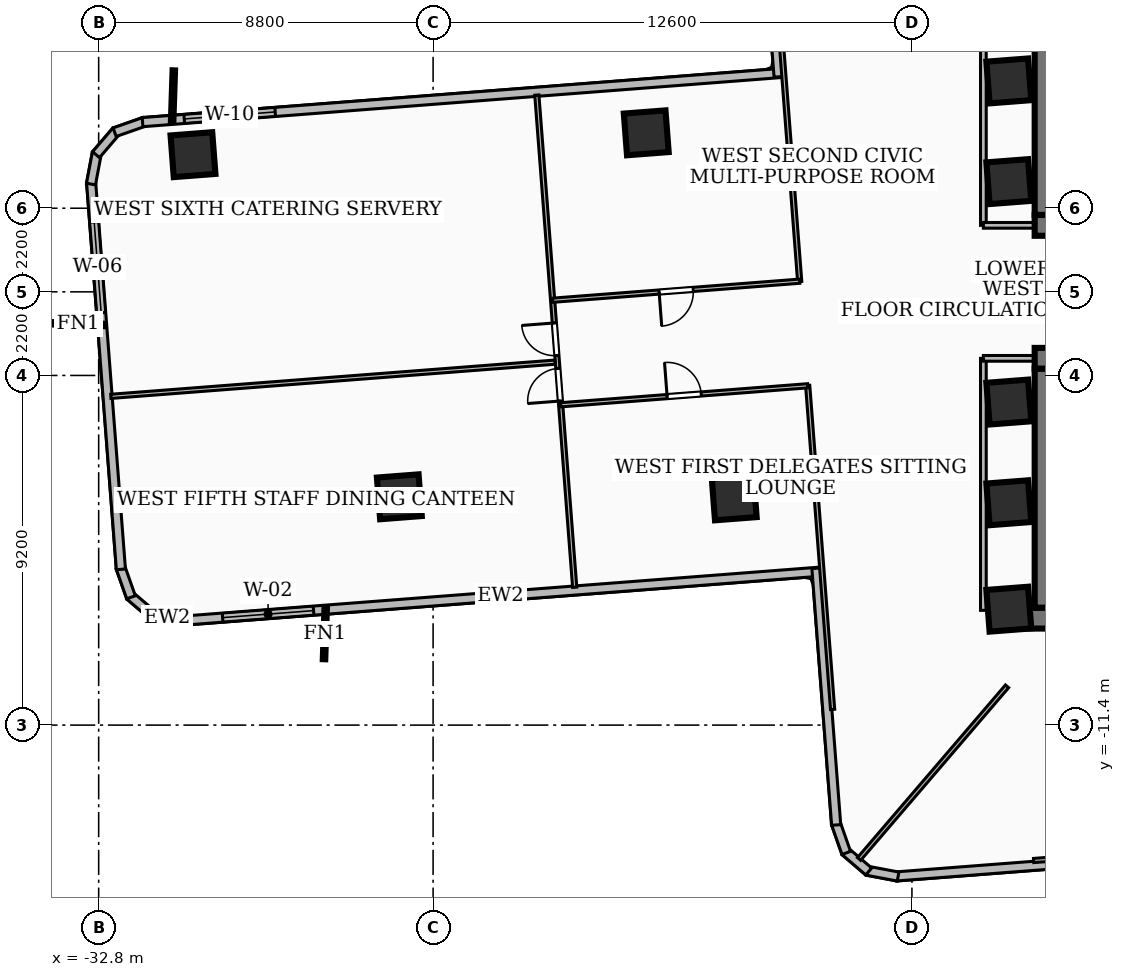
"""IFC4 building model, lengths in metres.
Left out: names, types, materials, properties, quantities, classifications, styles, units other than length and angle.
Written with IfcOpenShell. Run it as: python <this file> out.ifc"""

import sys

from ifc_helpers import new_model, si_unit, direction, frame, frame_2d, origin, origin_2d, place, context, subcontext, project, spatial, rectangle, extrude, element, fill, save


model = new_model("IFC4")
c1 = context("Model", 3, precision=1e-05, world=origin(), true_north=direction((0.0, 1.0)))
c2 = subcontext(c1, "Body", "Model", "MODEL_VIEW")
j1 = project(units=[si_unit("LENGTHUNIT", "METRE"), si_unit("PLANEANGLEUNIT", "RADIAN")], contexts=[c1])
p1 = place(None, origin())
s1 = spatial("IfcSite", under=j1, at=p1, CompositionType="ELEMENT")
p2 = place(p1, origin())
s2 = spatial("IfcBuilding", under=s1, at=p2, CompositionType="ELEMENT")
p3 = place(p2, frame((0.0, 0.0, 56.88)))
s3 = spatial("IfcBuildingStorey", under=s2, at=p3, CompositionType="ELEMENT", Elevation=56.88)
p4 = place(p3, frame((8.17, 1.75, 0.0), z_axis=(0.0, 0.0, 1.0), x_axis=(-1.0, 0.0, 0.0)))
e1 = element("IfcWall", 1, at=p4, inside=s3, PredefinedType="SHEAR", context=c2, shape_type="SweptSolid", body=[
    extrude(rectangle(XDim=16.34, YDim=0.55, at=frame_2d((8.17, 0.0))), origin(), (0.0, 0.0, 1.0), 3.32),
])
p5 = place(p4, frame((7.45, 0.0, 0.0)))
e2 = element("IfcOpeningElement", 2, at=p5, cuts=e1, PredefinedType="OPENING", context=c2, shape_type="SweptSolid", body=[
    extrude(rectangle(XDim=1.0, YDim=2.1, at=frame_2d((0.5, 1.05))), frame((0.0, 0.285, 0.0), z_axis=(0.0, -1.0, 0.0), x_axis=(1.0, 0.0, 0.0)), (0.0, 0.0, 1.0), 0.57),
])
p6 = place(p4, frame((3.4, 0.0, 0.0)))
e3 = element("IfcOpeningElement", 3, at=p6, cuts=e1, PredefinedType="OPENING", context=c2, shape_type="SweptSolid", body=[
    extrude(rectangle(XDim=0.9, YDim=2.06, at=frame_2d((0.45, 1.03))), frame((0.0, 0.285, 0.0), z_axis=(0.0, -1.0, 0.0), x_axis=(1.0, 0.0, 0.0)), (0.0, 0.0, 1.0), 0.57),
])
p7 = place(p4, frame((1.1, 0.0, 0.0)))
e4 = element("IfcOpeningElement", 4, at=p7, cuts=e1, PredefinedType="OPENING", context=c2, shape_type="SweptSolid", body=[
    extrude(rectangle(XDim=0.9, YDim=2.06, at=frame_2d((0.45, 1.03))), frame((0.0, 0.285, 0.0), z_axis=(0.0, -1.0, 0.0), x_axis=(1.0, 0.0, 0.0)), (0.0, 0.0, 1.0), 0.57),
])
p8 = place(p3, frame((-7.895, 2.025, 0.0), z_axis=(0.0, 0.0, 1.0), x_axis=(0.0, 1.0, 0.0)))
e5 = element("IfcWall", 5, at=p8, inside=s3, PredefinedType="SHEAR", context=c2, shape_type="SweptSolid", body=[
    extrude(rectangle(XDim=6.285, YDim=0.55, at=frame_2d((3.143, 0.0))), origin(), (0.0, 0.0, 1.0), 3.32),
])
p9 = place(p3, frame((8.78, -8.585, 0.0), z_axis=(0.0, 0.0, 1.0), x_axis=(-1.0, 0.0, 0.0)))
e6 = element("IfcWall", 6, at=p9, inside=s3, PredefinedType="SHEAR", context=c2, shape_type="SweptSolid", body=[
    extrude(rectangle(XDim=17.56, YDim=0.55, at=frame_2d((8.78, 0.0))), origin(), (0.0, 0.0, 1.0), 3.32),
])
p10 = place(p3, frame((-8.17, -1.75, 0.0), z_axis=(0.0, 0.0, 1.0), x_axis=(1.0, 0.0, 0.0)))
e7 = element("IfcWall", 7, at=p10, inside=s3, PredefinedType="SHEAR", context=c2, shape_type="SweptSolid", body=[
    extrude(rectangle(XDim=16.34, YDim=0.55, at=frame_2d((8.17, 0.0))), origin(), (0.0, 0.0, 1.0), 3.32),
])
p11 = place(p10, frame((7.45, 0.0, 0.0)))
e8 = element("IfcOpeningElement", 8, at=p11, cuts=e7, PredefinedType="OPENING", context=c2, shape_type="SweptSolid", body=[
    extrude(rectangle(XDim=1.0, YDim=2.1, at=frame_2d((0.5, 1.05))), frame((0.0, 0.285, 0.0), z_axis=(0.0, -1.0, 0.0), x_axis=(1.0, 0.0, 0.0)), (0.0, 0.0, 1.0), 0.57),
])
p12 = place(p10, frame((10.965, 0.0, 0.0)))
e9 = element("IfcOpeningElement", 9, at=p12, cuts=e7, PredefinedType="OPENING", context=c2, shape_type="SweptSolid", body=[
    extrude(rectangle(XDim=1.05, YDim=2.15, at=frame_2d((0.525, 1.075))), frame((0.0, 0.285, 0.0), z_axis=(0.0, -1.0, 0.0), x_axis=(1.0, 0.0, 0.0)), (0.0, 0.0, 1.0), 0.57),
])
p13 = place(p10, frame((12.525, 0.0, 0.0)))
e10 = element("IfcOpeningElement", 10, at=p13, cuts=e7, PredefinedType="OPENING", context=c2, shape_type="SweptSolid", body=[
    extrude(rectangle(XDim=1.05, YDim=2.15, at=frame_2d((0.525, 1.075))), frame((0.0, 0.285, 0.0), z_axis=(0.0, -1.0, 0.0), x_axis=(1.0, 0.0, 0.0)), (0.0, 0.0, 1.0), 0.57),
])
p14 = place(p10, frame((14.085, 0.0, 0.0)))
e11 = element("IfcOpeningElement", 11, at=p14, cuts=e7, PredefinedType="OPENING", context=c2, shape_type="SweptSolid", body=[
    extrude(rectangle(XDim=1.05, YDim=2.15, at=frame_2d((0.525, 1.075))), frame((0.0, 0.285, 0.0), z_axis=(0.0, -1.0, 0.0), x_axis=(1.0, 0.0, 0.0)), (0.0, 0.0, 1.0), 0.57),
])
p15 = place(p3, frame((-7.895, -8.31, 0.0), z_axis=(0.0, 0.0, 1.0), x_axis=(0.0, 1.0, 0.0)))
e12 = element("IfcWall", 12, at=p15, inside=s3, PredefinedType="SHEAR", context=c2, shape_type="SweptSolid", body=[
    extrude(rectangle(XDim=6.285, YDim=0.55, at=frame_2d((3.143, 0.0))), origin(), (0.0, 0.0, 1.0), 3.32),
])
for number, where, z_axis, x_axis in (
    (13, (-8.85, -5.55, 0.0), (0.0, 0.0, 1.0), (0.997, 0.077, 0.0)),
    (14, (-8.85, -2.9, 0.0), (0.0, 0.0, 1.0), (0.997, 0.077, 0.0)),
    (15, (-8.85, 2.9, 0.0), (0.0, 0.0, 1.0), (0.997, 0.077, 0.0)),
    (16, (-8.85, 5.55, 0.0), (0.0, 0.0, 1.0), (0.997, 0.077, 0.0)),
    (17, (-8.85, -8.35, 0.0), (0.0, 0.0, 1.0), (0.997, 0.077, 0.0)),
    (18, (-18.391, 4.184, 0.0), (0.0, 0.0, 1.0), (0.997, 0.077, 0.0)),
    (19, (-16.076, -5.421, 0.0), (0.0, 0.0, 1.0), (0.997, 0.077, 0.0)),
    (20, (-30.318, 3.609, 0.0), (0.0, 0.0, 1.0), (0.997, 0.077, 0.0)),
    (21, (-24.888, -5.393, 0.0), (0.0, 0.0, 1.0), (0.997, 0.077, 0.0)),
):
    element("IfcColumn", number, at=place(p3, frame(where, z_axis=z_axis, x_axis=x_axis)), inside=s3, PredefinedType="COLUMN", context=c2, shape_type="SweptSolid", body=[
        extrude(rectangle(XDim=1.1, YDim=1.1, at=origin_2d()), origin(), (0.0, 0.0, 1.0), 3.6),
    ])
p16 = place(p3, frame((-13.81, -7.362, 0.0), z_axis=(0.0, 0.0, 1.0), x_axis=(-0.997055761943, -0.076679903335, 0.0)))
e22 = element("IfcWall", 22, at=p16, inside=s3, PredefinedType="SOLIDWALL", context=c2, shape_type="SweptSolid", body=[
    extrude(rectangle(XDim=16.875, YDim=0.24, at=frame_2d((8.438, 0.0))), origin(), (0.0, 0.0, 1.0), 3.32),
])
p17 = place(p16, frame((13.375, 0.0, 0.85)))
e23 = element("IfcOpeningElement", 23, at=p17, cuts=e22, PredefinedType="OPENING", context=c2, shape_type="SweptSolid", body=[
    extrude(rectangle(XDim=2.4, YDim=2.1, at=frame_2d((1.2, 1.05))), frame((0.0, 0.13, 0.0), z_axis=(0.0, -1.0, 0.0), x_axis=(1.0, 0.0, 0.0)), (0.0, 0.0, 1.0), 0.26),
])
p18 = place(p3, frame((-30.585, -8.659, 0.0), z_axis=(0.0, 0.0, 1.0), x_axis=(-0.982688894005, 0.185263427582, 0.0)))
e24 = element("IfcWall", 24, at=p18, inside=s3, PredefinedType="SOLIDWALL", context=c2, shape_type="SweptSolid", body=[
    extrude(rectangle(XDim=0.832, YDim=0.24, at=frame_2d((0.416, 0.0))), origin(), (0.0, 0.0, 1.0), 3.32),
])
p19 = place(p3, frame((-31.358, -8.526, 0.0), z_axis=(0.0, 0.0, 1.0), x_axis=(-0.759891778471, 0.650049601962, 0.0)))
e25 = element("IfcWall", 25, at=p19, inside=s3, PredefinedType="SOLIDWALL", context=c2, shape_type="SweptSolid", body=[
    extrude(rectangle(XDim=0.813, YDim=0.24, at=frame_2d((0.407, 0.0))), origin(), (0.0, 0.0, 1.0), 3.32),
])
p20 = place(p3, frame((-31.949, -8.037, 0.0), z_axis=(0.0, 0.0, 1.0), x_axis=(-0.332128799234, 0.943234043448, 0.0)))
e26 = element("IfcWall", 26, at=p20, inside=s3, PredefinedType="SOLIDWALL", context=c2, shape_type="SweptSolid", body=[
    extrude(rectangle(XDim=0.831, YDim=0.24, at=frame_2d((0.416, 0.0))), origin(), (0.0, 0.0, 1.0), 3.32),
])
p21 = place(p3, frame((-32.215, -7.302, 0.0), z_axis=(0.0, 0.0, 1.0), x_axis=(-0.076720251263, 0.997052658111, 0.0)))
e27 = element("IfcWall", 27, at=p21, inside=s3, PredefinedType="SOLIDWALL", context=c2, shape_type="SweptSolid", body=[
    extrude(rectangle(XDim=10.218, YDim=0.24, at=frame_2d((5.109, 0.0))), origin(), (0.0, 0.0, 1.0), 3.32),
])
p22 = place(p21, frame((6.77, 0.0, 0.85)))
e28 = element("IfcOpeningElement", 28, at=p22, cuts=e27, PredefinedType="OPENING", context=c2, shape_type="SweptSolid", body=[
    extrude(rectangle(XDim=2.4, YDim=1.85, at=frame_2d((1.2, 0.925))), frame((0.0, 0.13, 0.0), z_axis=(0.0, -1.0, 0.0), x_axis=(1.0, 0.0, 0.0)), (0.0, 0.0, 1.0), 0.26),
])
p23 = place(p3, frame((-33.002, 2.836, 0.0), z_axis=(0.0, 0.0, 1.0), x_axis=(0.185263427582, 0.982688894005, 0.0)))
e29 = element("IfcWall", 29, at=p23, inside=s3, PredefinedType="SOLIDWALL", context=c2, shape_type="SweptSolid", body=[
    extrude(rectangle(XDim=0.832, YDim=0.24, at=frame_2d((0.416, 0.0))), origin(), (0.0, 0.0, 1.0), 3.32),
])
p24 = place(p3, frame((-32.869, 3.609, 0.0), z_axis=(0.0, 0.0, 1.0), x_axis=(0.650049601962, 0.759891778471, 0.0)))
e30 = element("IfcWall", 30, at=p24, inside=s3, PredefinedType="SOLIDWALL", context=c2, shape_type="SweptSolid", body=[
    extrude(rectangle(XDim=0.813, YDim=0.24, at=frame_2d((0.407, 0.0))), origin(), (0.0, 0.0, 1.0), 3.32),
])
p25 = place(p3, frame((-32.38, 4.2, 0.0), z_axis=(0.0, 0.0, 1.0), x_axis=(0.943569376564, 0.331174926, 0.0)))
e31 = element("IfcWall", 31, at=p25, inside=s3, PredefinedType="SOLIDWALL", context=c2, shape_type="SweptSolid", body=[
    extrude(rectangle(XDim=0.831, YDim=0.24, at=frame_2d((0.416, 0.0))), origin(), (0.0, 0.0, 1.0), 3.32),
])
p26 = place(p3, frame((-31.645, 4.465, 0.0), z_axis=(0.0, 0.0, 1.0), x_axis=(0.997051676532, 0.076733006752, 0.0)))
e32 = element("IfcWall", 32, at=p26, inside=s3, PredefinedType="SOLIDWALL", context=c2, shape_type="SweptSolid", body=[
    extrude(rectangle(XDim=16.876, YDim=0.24, at=frame_2d((8.438, 0.0))), origin(), (0.0, 0.0, 1.0), 3.32),
])
p27 = place(p26, frame((1.1, 0.0, 0.85)))
e33 = element("IfcOpeningElement", 33, at=p27, cuts=e32, PredefinedType="OPENING", context=c2, shape_type="SweptSolid", body=[
    extrude(rectangle(XDim=2.4, YDim=1.65, at=frame_2d((1.2, 0.825))), frame((0.0, 0.13, 0.0), z_axis=(0.0, -1.0, 0.0), x_axis=(1.0, 0.0, 0.0)), (0.0, 0.0, 1.0), 0.26),
])
p28 = place(p3, frame((-14.908, 5.657, 0.0), z_axis=(0.0, 0.0, 1.0), x_axis=(-0.076778128006, 0.997048202977, 0.0)))
e34 = element("IfcWall", 34, at=p28, inside=s3, PredefinedType="SOLIDWALL", context=c2, shape_type="SweptSolid", body=[
    extrude(rectangle(XDim=6.175, YDim=0.24, at=frame_2d((3.088, 0.0))), origin(), (0.0, 0.0, 1.0), 3.32),
])
p29 = place(p3, frame((-5.657, -14.908, 0.0), z_axis=(0.0, 0.0, 1.0), x_axis=(-0.997048202977, -0.076778128006, 0.0)))
e35 = element("IfcWall", 35, at=p29, inside=s3, PredefinedType="SOLIDWALL", context=c2, shape_type="SweptSolid", body=[
    extrude(rectangle(XDim=6.175, YDim=0.24, at=frame_2d((3.088, 0.0))), origin(), (0.0, 0.0, 1.0), 2.401),
])
p30 = place(p3, frame((-11.764, -15.385, 0.0), z_axis=(0.0, 0.0, 1.0), x_axis=(-0.982688894005, 0.185263427582, 0.0)))
e36 = element("IfcWall", 36, at=p30, inside=s3, PredefinedType="SOLIDWALL", context=c2, shape_type="SweptSolid", body=[
    extrude(rectangle(XDim=0.832, YDim=0.24, at=frame_2d((0.416, 0.0))), origin(), (0.0, 0.0, 1.0), 3.32),
])
p31 = place(p3, frame((-12.537, -15.252, 0.0), z_axis=(0.0, 0.0, 1.0), x_axis=(-0.759616636226, 0.650371098657, 0.0)))
e37 = element("IfcWall", 37, at=p31, inside=s3, PredefinedType="SOLIDWALL", context=c2, shape_type="SweptSolid", body=[
    extrude(rectangle(XDim=0.813, YDim=0.24, at=frame_2d((0.407, 0.0))), origin(), (0.0, 0.0, 1.0), 3.32),
])
p32 = place(p3, frame((-13.128, -14.763, 0.0), z_axis=(0.0, 0.0, 1.0), x_axis=(-0.331174926, 0.943569376564, 0.0)))
e38 = element("IfcWall", 38, at=p32, inside=s3, PredefinedType="SOLIDWALL", context=c2, shape_type="SweptSolid", body=[
    extrude(rectangle(XDim=0.831, YDim=0.24, at=frame_2d((0.416, 0.0))), origin(), (0.0, 0.0, 1.0), 3.32),
])
p33 = place(p3, frame((-13.393, -14.028, 0.0), z_axis=(0.0, 0.0, 1.0), x_axis=(-0.076754366588, 0.997050032451, 0.0)))
e39 = element("IfcWall", 39, at=p33, inside=s3, PredefinedType="SOLIDWALL", context=c2, shape_type="SweptSolid", body=[
    extrude(rectangle(XDim=6.775, YDim=0.24, at=frame_2d((3.388, 0.0))), origin(), (0.0, 0.0, 1.0), 3.32),
])
p34 = place(p3, frame((-9.52, 1.75, 0.0), z_axis=(0.0, 0.0, 1.0), x_axis=(0.0, 1.0, 0.0)))
e40 = element("IfcWall", 40, at=p34, inside=s3, PredefinedType="PARTITIONING", context=c2, shape_type="SweptSolid", body=[
    extrude(rectangle(XDim=6.63, YDim=0.15, at=frame_2d((3.315, 0.0))), origin(), (0.0, 0.0, 1.0), 2.401),
])
p35 = place(p3, frame((-7.85, 1.75, 0.0), z_axis=(0.0, 0.0, 1.0), x_axis=(-1.0, 0.0, 0.0)))
e41 = element("IfcWall", 41, at=p35, inside=s3, PredefinedType="PARTITIONING", context=c2, shape_type="SweptSolid", body=[
    extrude(rectangle(XDim=1.67, YDim=0.15, at=frame_2d((0.835, 0.0))), origin(), (0.0, 0.0, 1.0), 2.385),
])
p36 = place(p3, frame((-9.52, -8.38, 0.0), z_axis=(0.0, 0.0, 1.0), x_axis=(0.0, 1.0, 0.0)))
e42 = element("IfcWall", 42, at=p36, inside=s3, PredefinedType="PARTITIONING", context=c2, shape_type="SweptSolid", body=[
    extrude(rectangle(XDim=6.63, YDim=0.15, at=frame_2d((3.315, 0.0))), origin(), (0.0, 0.0, 1.0), 2.401),
])
p37 = place(p3, frame((-7.85, -1.75, 0.0), z_axis=(0.0, 0.0, 1.0), x_axis=(-1.0, 0.0, 0.0)))
e43 = element("IfcWall", 43, at=p37, inside=s3, PredefinedType="PARTITIONING", context=c2, shape_type="SweptSolid", body=[
    extrude(rectangle(XDim=1.67, YDim=0.15, at=frame_2d((0.835, 0.0))), origin(), (0.0, 0.0, 1.0), 2.385),
])
p38 = place(p3, frame((-8.897, -10.38, 0.0), z_axis=(0.0, 0.0, 1.0), x_axis=(-0.650777932984, -0.759268122564, 0.0)))
e44 = element("IfcWall", 44, at=p38, inside=s3, PredefinedType="PARTITIONING", context=c2, shape_type="SweptSolid", body=[
    extrude(rectangle(XDim=5.984, YDim=0.11, at=frame_2d((2.992, 0.0))), origin(), (0.0, 0.0, 1.0), 3.32),
])
p39 = place(p3, frame((-14.143, -2.462, 0.0), z_axis=(0.0, 0.0, 1.0), x_axis=(0.076722700704, -0.997052469631, 0.0)))
e45 = element("IfcWall", 45, at=p39, inside=s3, PredefinedType="PARTITIONING", context=c2, shape_type="SweptSolid", body=[
    extrude(rectangle(XDim=8.55, YDim=0.11, at=frame_2d((4.275, 0.0))), origin(), (0.0, 0.0, 1.0), 2.401),
])
p40 = place(p3, frame((-14.963, 8.197, 0.0), z_axis=(0.0, 0.0, 1.0), x_axis=(0.076708240121, -0.99705358226, 0.0)))
e46 = element("IfcWall", 46, at=p40, inside=s3, PredefinedType="PARTITIONING", context=c2, shape_type="SweptSolid", body=[
    extrude(rectangle(XDim=7.95, YDim=0.11, at=frame_2d((3.975, 0.0))), origin(), (0.0, 0.0, 1.0), 2.401),
])
p41 = place(p3, frame((-20.643, -2.972, 0.0), z_axis=(0.0, 0.0, 1.0), x_axis=(0.997055366468, 0.076685045461, 0.0)))
e47 = element("IfcWall", 47, at=p41, inside=s3, PredefinedType="PARTITIONING", context=c2, shape_type="SweptSolid", body=[
    extrude(rectangle(XDim=6.52, YDim=0.11, at=frame_2d((3.26, 0.0))), origin(), (0.0, 0.0, 1.0), 3.32),
])
p42 = place(p41, frame((2.81, 0.0, 0.0)))
e48 = element("IfcOpeningElement", 48, at=p42, cuts=e47, PredefinedType="OPENING", context=c2, shape_type="SweptSolid", body=[
    extrude(rectangle(XDim=0.9, YDim=2.06, at=frame_2d((0.45, 1.03))), frame((0.0, 0.065, 0.0), z_axis=(0.0, -1.0, 0.0), x_axis=(1.0, 0.0, 0.0)), (0.0, 0.0, 1.0), 0.13),
])
p43 = place(p3, frame((-14.354, 0.28, 0.0), z_axis=(0.0, 0.0, 1.0), x_axis=(-0.997043903764, -0.076833937604, 0.0)))
e49 = element("IfcWall", 49, at=p43, inside=s3, PredefinedType="PARTITIONING", context=c2, shape_type="SweptSolid", body=[
    extrude(rectangle(XDim=6.52, YDim=0.11, at=frame_2d((3.26, 0.0))), origin(), (0.0, 0.0, 1.0), 3.32),
])
p44 = place(p43, frame((2.81, 0.0, 0.0)))
e50 = element("IfcOpeningElement", 50, at=p44, cuts=e49, PredefinedType="OPENING", context=c2, shape_type="SweptSolid", body=[
    extrude(rectangle(XDim=0.9, YDim=2.06, at=frame_2d((0.45, 1.03))), frame((0.0, 0.065, 0.0), z_axis=(0.0, -1.0, 0.0), x_axis=(1.0, 0.0, 0.0)), (0.0, 0.0, 1.0), 0.13),
])
p45 = place(p3, frame((-20.789, -1.85, 0.0), z_axis=(0.0, 0.0, 1.0), x_axis=(-0.997050564889, -0.076747449822, 0.0)))
e51 = element("IfcWall", 51, at=p45, inside=s3, PredefinedType="PARTITIONING", context=c2, shape_type="SweptSolid", body=[
    extrude(rectangle(XDim=11.726, YDim=0.11, at=frame_2d((5.863, 0.0))), origin(), (0.0, 0.0, 1.0), 2.812),
])
p46 = place(p3, frame((-20.274, -7.773, 0.0), z_axis=(0.0, 0.0, 1.0), x_axis=(-0.076686437656, 0.997055259391, 0.0)))
e52 = element("IfcWall", 52, at=p46, inside=s3, PredefinedType="PARTITIONING", context=c2, shape_type="SweptSolid", body=[
    extrude(rectangle(XDim=12.989, YDim=0.11, at=frame_2d((6.495, 0.0))), origin(), (0.0, 0.0, 1.0), 2.401),
])
p47 = place(p46, frame((6.115, 0.0, 0.0)))
e53 = element("IfcOpeningElement", 53, at=p47, cuts=e52, PredefinedType="OPENING", context=c2, shape_type="SweptSolid", body=[
    extrude(rectangle(XDim=0.86, YDim=2.04, at=frame_2d((0.43, 1.02))), frame((0.0, 0.065, 0.0), z_axis=(0.0, -1.0, 0.0), x_axis=(1.0, 0.0, 0.0)), (0.0, 0.0, 1.0), 0.13),
])
p48 = place(p46, frame((4.915, 0.0, 0.0)))
e54 = element("IfcOpeningElement", 54, at=p48, cuts=e52, PredefinedType="OPENING", context=c2, shape_type="SweptSolid", body=[
    extrude(rectangle(XDim=0.86, YDim=2.04, at=frame_2d((0.43, 1.02))), frame((0.0, 0.065, 0.0), z_axis=(0.0, -1.0, 0.0), x_axis=(1.0, 0.0, 0.0)), (0.0, 0.0, 1.0), 0.13),
])
p49 = place(p3, frame((-8.197, -14.963, 0.0), z_axis=(0.0, 0.0, 1.0), x_axis=(0.99705358226, 0.076708240121, 0.0)))
e55 = element("IfcWall", 55, at=p49, inside=s3, PredefinedType="PARTITIONING", context=c2, shape_type="SweptSolid", body=[
    extrude(rectangle(XDim=7.95, YDim=0.11, at=frame_2d((3.975, 0.0))), origin(), (0.0, 0.0, 1.0), 2.401),
])
p50 = place(p17, origin())
e56 = element("IfcWindow", 56, at=p50, inside=s3, PartitioningType="SINGLE_PANEL", PredefinedType="WINDOW", context=c2, shape_type="SweptSolid", body=[
    extrude(rectangle(XDim=2.4, YDim=2.1, at=frame_2d((1.2, 1.05))), frame((0.0, 0.03, 0.0), z_axis=(0.0, -1.0, 0.0), x_axis=(1.0, 0.0, 0.0)), (0.0, 0.0, 1.0), 0.06),
])
fill(e23, e56)
p51 = place(p22, origin())
e57 = element("IfcWindow", 57, at=p51, inside=s3, PartitioningType="SINGLE_PANEL", PredefinedType="WINDOW", context=c2, shape_type="SweptSolid", body=[
    extrude(rectangle(XDim=2.4, YDim=1.85, at=frame_2d((1.2, 0.925))), frame((0.0, 0.03, 0.0), z_axis=(0.0, -1.0, 0.0), x_axis=(1.0, 0.0, 0.0)), (0.0, 0.0, 1.0), 0.06),
])
fill(e28, e57)
p52 = place(p27, origin())
e58 = element("IfcWindow", 58, at=p52, inside=s3, PartitioningType="SINGLE_PANEL", PredefinedType="WINDOW", context=c2, shape_type="SweptSolid", body=[
    extrude(rectangle(XDim=2.4, YDim=1.65, at=frame_2d((1.2, 0.825))), frame((0.0, 0.03, 0.0), z_axis=(0.0, -1.0, 0.0), x_axis=(1.0, 0.0, 0.0)), (0.0, 0.0, 1.0), 0.06),
])
fill(e33, e58)
p53 = place(p42, origin())
e59 = element("IfcDoor", 59, at=p53, inside=s3, OperationType="SINGLE_SWING_LEFT", PredefinedType="DOOR", context=c2, shape_type="SweptSolid", body=[
    extrude(rectangle(XDim=0.9, YDim=2.06, at=frame_2d((0.45, 1.03))), frame((0.0, 0.025, 0.0), z_axis=(0.0, -1.0, 0.0), x_axis=(1.0, 0.0, 0.0)), (0.0, 0.0, 1.0), 0.05),
])
fill(e48, e59)
p54 = place(p44, origin())
e60 = element("IfcDoor", 60, at=p54, inside=s3, OperationType="SINGLE_SWING_RIGHT", PredefinedType="DOOR", context=c2, shape_type="SweptSolid", body=[
    extrude(rectangle(XDim=0.9, YDim=2.06, at=frame_2d((0.45, 1.03))), frame((0.0, 0.025, 0.0), z_axis=(0.0, -1.0, 0.0), x_axis=(1.0, 0.0, 0.0)), (0.0, 0.0, 1.0), 0.05),
])
fill(e50, e60)
p55 = place(p47, origin())
e61 = element("IfcDoor", 61, at=p55, inside=s3, OperationType="SINGLE_SWING_RIGHT", PredefinedType="DOOR", context=c2, shape_type="SweptSolid", body=[
    extrude(rectangle(XDim=0.86, YDim=2.04, at=frame_2d((0.43, 1.02))), frame((0.0, 0.025, 0.0), z_axis=(0.0, -1.0, 0.0), x_axis=(1.0, 0.0, 0.0)), (0.0, 0.0, 1.0), 0.05),
])
fill(e53, e61)
p56 = place(p48, origin())
e62 = element("IfcDoor", 62, at=p56, inside=s3, OperationType="SINGLE_SWING_LEFT", PredefinedType="DOOR", context=c2, shape_type="SweptSolid", body=[
    extrude(rectangle(XDim=0.86, YDim=2.04, at=frame_2d((0.43, 1.02))), frame((0.0, 0.025, 0.0), z_axis=(0.0, -1.0, 0.0), x_axis=(1.0, 0.0, 0.0)), (0.0, 0.0, 1.0), 0.05),
])
fill(e54, e62)
save(model, sys.argv[1])
